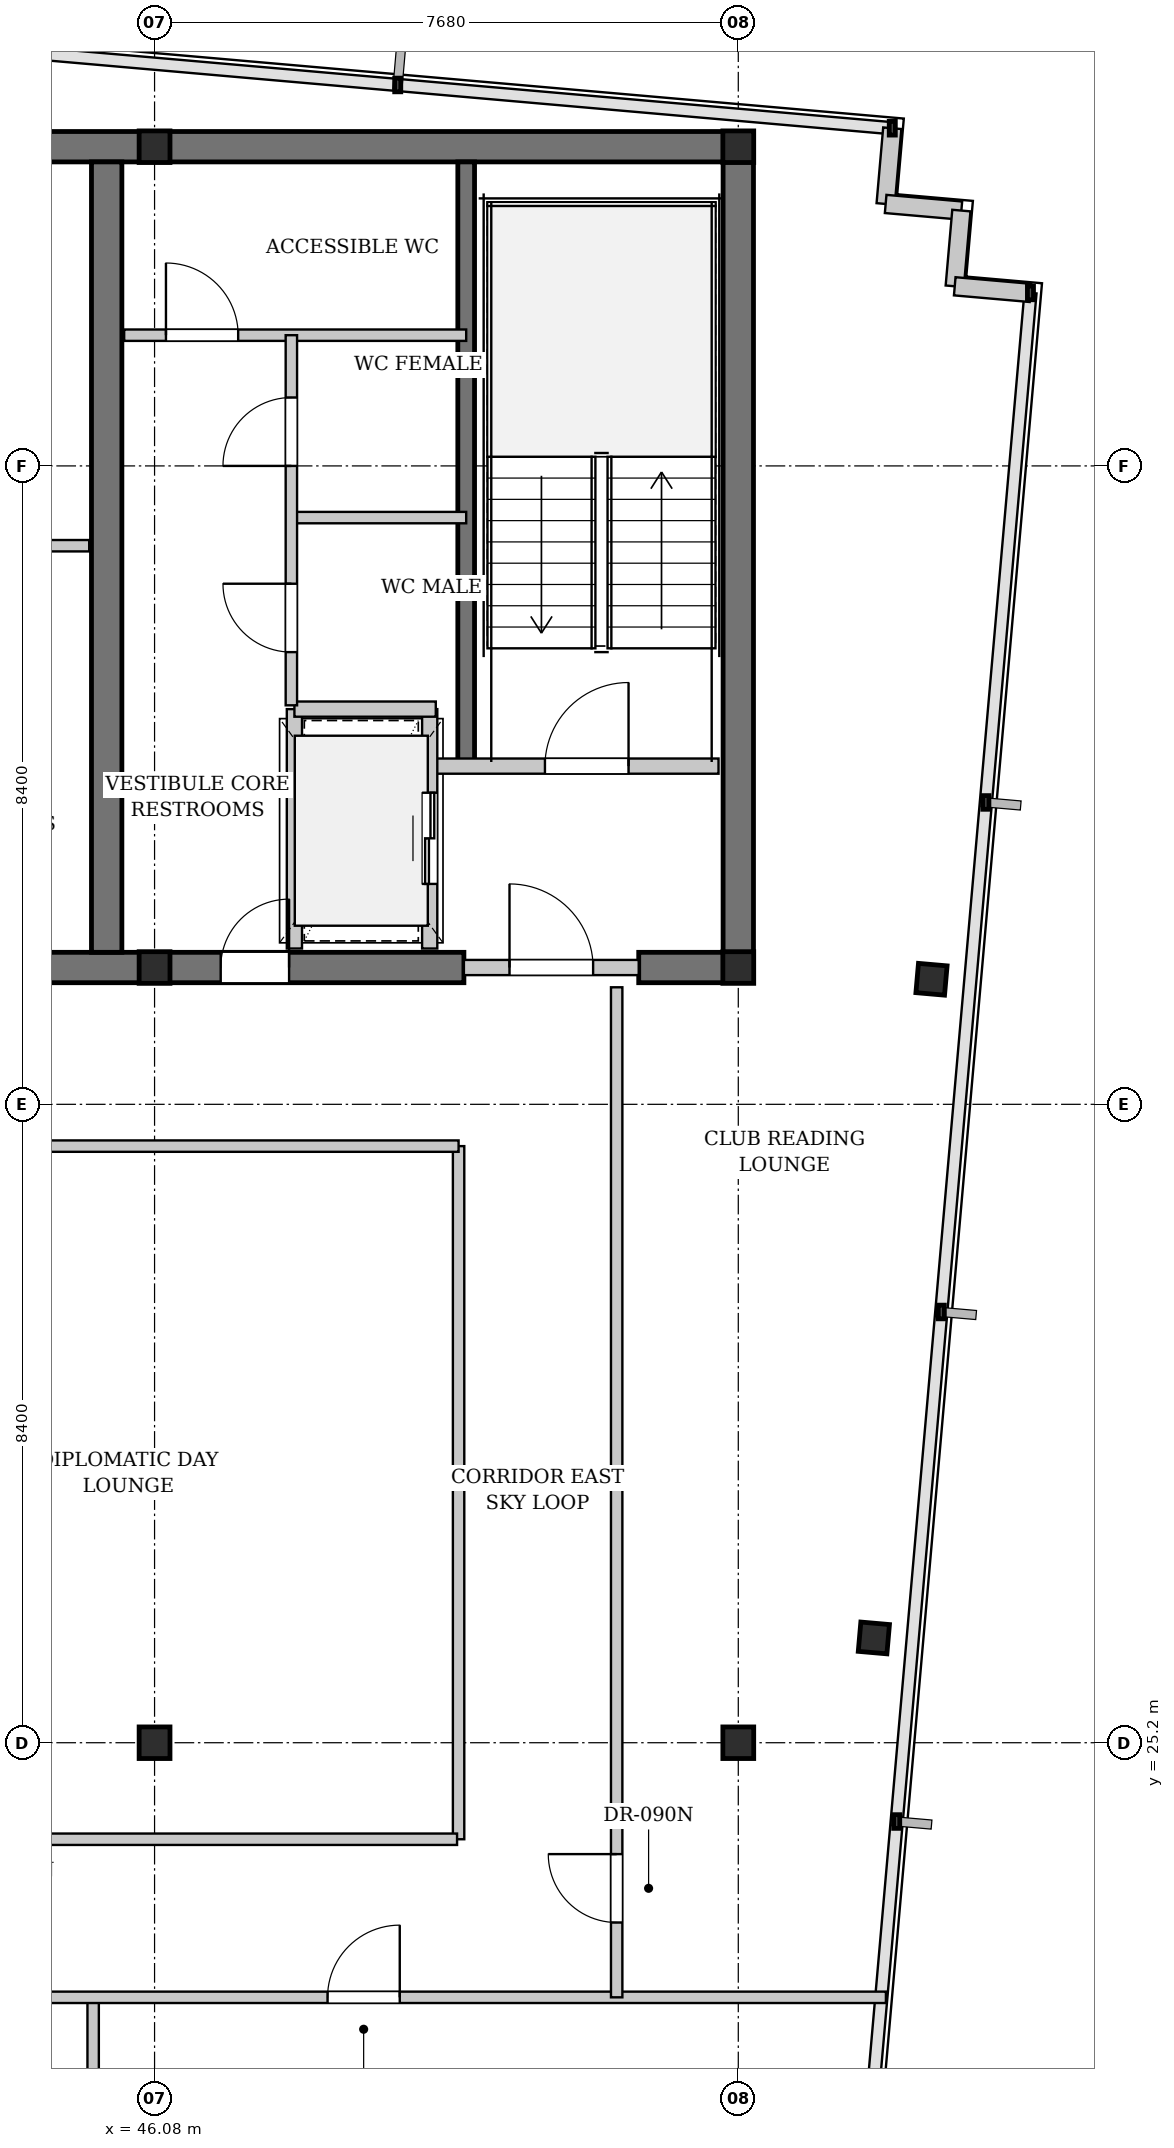
"""IFC4 building model, lengths in metres.
Left out: names, types, materials, properties, quantities, classifications, styles, units other than length and angle.
Written with IfcOpenShell. Run it as: python <this file> out.ifc"""

import sys

from ifc_helpers import new_model, si_unit, direction, frame, frame_2d, origin, origin_2d, place, context, subcontext, project, spatial, rectangle, i_section, extrude, element, fill, save


model = new_model("IFC4")
c1 = context("Model", 3, precision=1e-05, world=origin(), true_north=direction((0.0, 1.0)))
c2 = subcontext(c1, "Body", "Model", "MODEL_VIEW")
j1 = project(units=[si_unit("LENGTHUNIT", "METRE"), si_unit("PLANEANGLEUNIT", "RADIAN")], contexts=[c1])
p1 = place(None, origin())
s1 = spatial("IfcSite", under=j1, at=p1, CompositionType="ELEMENT")
p2 = place(p1, origin())
s2 = spatial("IfcBuilding", under=s1, at=p2, CompositionType="ELEMENT")
p3 = place(p2, frame((0.0, 0.0, 276.1)))
s3 = spatial("IfcBuildingStorey", under=s2, at=p3, CompositionType="ELEMENT", Elevation=276.1)
p4 = place(p3, frame((22.84, 46.2, 0.0), z_axis=(0.0, 0.0, 1.0), x_axis=(1.0, 0.0, 0.0)))
e1 = element("IfcWall", 1, at=p4, inside=s3, PredefinedType="SHEAR", context=c2, shape_type="SweptSolid", body=[
    extrude(rectangle(XDim=31.12, YDim=0.4, at=frame_2d((15.56, 0.0))), origin(), (0.0, 0.0, 1.0), 3.18),
])
p5 = place(p3, frame((42.1, 35.4, 0.0), z_axis=(0.0, 0.0, 1.0), x_axis=(1.0, 0.0, 0.0)))
e2 = element("IfcWall", 2, at=p5, inside=s3, PredefinedType="SHEAR", context=c2, shape_type="SweptSolid", body=[
    extrude(rectangle(XDim=8.05, YDim=0.4, at=frame_2d((4.025, 0.0))), origin(), (0.0, 0.0, 1.0), 3.18),
])
p6 = place(p5, frame((4.85, 0.0, 0.0)))
e3 = element("IfcOpeningElement", 3, at=p6, cuts=e2, PredefinedType="OPENING", context=c2, shape_type="SweptSolid", body=[
    extrude(rectangle(XDim=0.9, YDim=2.15, at=frame_2d((0.45, 1.075))), frame((0.0, 0.21, 0.0), z_axis=(0.0, -1.0, 0.0), x_axis=(1.0, 0.0, 0.0)), (0.0, 0.0, 1.0), 0.42),
])
p7 = place(p3, frame((52.45, 35.4, 0.0), z_axis=(0.0, 0.0, 1.0), x_axis=(1.0, 0.0, 0.0)))
e4 = element("IfcWall", 4, at=p7, inside=s3, PredefinedType="SHEAR", context=c2, shape_type="SweptSolid", body=[
    extrude(rectangle(XDim=1.51, YDim=0.4, at=frame_2d((0.755, 0.0))), origin(), (0.0, 0.0, 1.0), 3.18),
])
for number, where, z_axis, x_axis in (
    (5, (45.45, 35.6, 0.0), (0.0, 0.0, 1.0), (0.0, 1.0, 0.0)),
    (6, (53.76, 35.6, 0.0), (0.0, 0.0, 1.0), (0.0, 1.0, 0.0)),
):
    element("IfcWall", number, at=place(p3, frame(where, z_axis=z_axis, x_axis=x_axis)), inside=s3, PredefinedType="SHEAR", context=c2, shape_type="SweptSolid", body=[
        extrude(rectangle(XDim=10.4, YDim=0.4, at=frame_2d((5.2, 0.0))), origin(), (0.0, 0.0, 1.0), 3.18),
    ])
p8 = place(p3, frame((50.18, 38.05, 0.0), z_axis=(0.0, 0.0, 1.0), x_axis=(0.0, 1.0, 0.0)))
e7 = element("IfcWall", 7, at=p8, inside=s3, PredefinedType="SHEAR", context=c2, shape_type="SweptSolid", body=[
    extrude(rectangle(XDim=7.95, YDim=0.22, at=frame_2d((3.975, 0.0))), origin(), (0.0, 0.0, 1.0), 3.18),
])
for number, where, z_axis, x_axis in (
    (8, (46.08, 35.4, 0.0), (0.0, 0.0, 1.0), (1.0, 0.0, 0.0)),
    (9, (46.08, 46.2, 0.0), (0.0, 0.0, 1.0), (1.0, 0.0, 0.0)),
    (10, (46.08, 25.2, 0.0), (0.0, 0.0, 1.0), (1.0, 0.0, 0.0)),
    (11, (53.76, 35.4, 0.0), (0.0, 0.0, 1.0), (1.0, 0.0, 0.0)),
    (12, (53.76, 46.2, 0.0), (0.0, 0.0, 1.0), (1.0, 0.0, 0.0)),
    (13, (53.76, 25.2, 0.0), (0.0, 0.0, 1.0), (1.0, 0.0, 0.0)),
):
    element("IfcColumn", number, at=place(p3, frame(where, z_axis=z_axis, x_axis=x_axis)), inside=s3, PredefinedType="COLUMN", context=c2, shape_type="SweptSolid", body=[
        extrude(i_section(OverallWidth=0.406, OverallDepth=0.416, WebThickness=0.03, FlangeThickness=0.048, FilletRadius=0.015, at=origin_2d()), origin(), (0.0, 0.0, 1.0), 3.4),
    ])
for number, where, z_axis, x_axis in (
    (14, (55.544, 26.579, 0.0), (0.0, 0.0, 1.0), (0.996, -0.087, 0.0)),
    (15, (56.302, 35.246, 0.0), (0.0, 0.0, 1.0), (0.996, -0.087, 0.0)),
):
    element("IfcColumn", number, at=place(p3, frame(where, z_axis=z_axis, x_axis=x_axis)), inside=s3, PredefinedType="COLUMN", context=c2, shape_type="SweptSolid", body=[
        extrude(i_section(OverallWidth=0.378, OverallDepth=0.387, WebThickness=0.021, FlangeThickness=0.033, FilletRadius=0.015, at=origin_2d()), origin(), (0.0, 0.0, 1.0), 3.4),
    ])
for number, where, z_axis, x_axis in (
    (16, (55.786, 46.443, 0.0), (0.0, 0.0, 1.0), (-0.087, -0.996, 0.0)),
    (17, (55.699, 45.447, 0.0), (0.0, 0.0, 1.0), (0.996, -0.087, 0.0)),
    (18, (56.695, 45.36, 0.0), (0.0, 0.0, 1.0), (-0.087, -0.996, 0.0)),
    (19, (56.608, 44.364, 0.0), (0.0, 0.0, 1.0), (0.996, -0.087, 0.0)),
):
    element("IfcWall", number, at=place(p3, frame(where, z_axis=z_axis, x_axis=x_axis)), inside=s3, PredefinedType="SOLIDWALL", context=c2, shape_type="SweptSolid", body=[
        extrude(rectangle(XDim=1.0, YDim=0.24, at=frame_2d((0.5, 0.0))), origin(), (0.0, 0.0, 1.0), 3.18),
    ])
p9 = place(p3, frame((41.85, 40.95, 0.0), z_axis=(0.0, 0.0, 1.0), x_axis=(1.0, 0.0, 0.0)))
e20 = element("IfcWall", 20, at=p9, inside=s3, PredefinedType="PARTITIONING", context=c2, shape_type="SweptSolid", body=[
    extrude(rectangle(XDim=3.37, YDim=0.15, at=frame_2d((1.685, 0.0))), origin(), (0.0, 0.0, 1.0), 3.18),
])
p10 = place(p3, frame((49.78, 38.05, 0.0), z_axis=(0.0, 0.0, 1.0), x_axis=(1.0, 0.0, 0.0)))
e21 = element("IfcWall", 21, at=p10, inside=s3, PredefinedType="PARTITIONING", context=c2, shape_type="SweptSolid", body=[
    extrude(rectangle(XDim=3.72, YDim=0.2, at=frame_2d((1.86, 0.0))), origin(), (0.0, 0.0, 1.0), 3.18),
])
p11 = place(p10, frame((1.436, 0.0, 0.0)))
e22 = element("IfcOpeningElement", 22, at=p11, cuts=e21, PredefinedType="OPENING", context=c2, shape_type="SweptSolid", body=[
    extrude(rectangle(XDim=1.1, YDim=2.15, at=frame_2d((0.55, 1.075))), frame((0.0, 0.11, 0.0), z_axis=(0.0, -1.0, 0.0), x_axis=(1.0, 0.0, 0.0)), (0.0, 0.0, 1.0), 0.22),
])
p12 = place(p3, frame((50.15, 35.4, 0.0), z_axis=(0.0, 0.0, 1.0), x_axis=(1.0, 0.0, 0.0)))
e23 = element("IfcWall", 23, at=p12, inside=s3, PredefinedType="PARTITIONING", context=c2, shape_type="SweptSolid", body=[
    extrude(rectangle(XDim=2.3, YDim=0.2, at=frame_2d((1.15, 0.0))), origin(), (0.0, 0.0, 1.0), 2.575),
])
p13 = place(p12, frame((0.6, 0.0, 0.0)))
e24 = element("IfcOpeningElement", 24, at=p13, cuts=e23, PredefinedType="OPENING", context=c2, shape_type="SweptSolid", body=[
    extrude(rectangle(XDim=1.1, YDim=2.15, at=frame_2d((0.55, 1.075))), frame((0.0, 0.11, 0.0), z_axis=(0.0, -1.0, 0.0), x_axis=(1.0, 0.0, 0.0)), (0.0, 0.0, 1.0), 0.22),
])
p14 = place(p3, frame((49.7, 35.65, 0.0), z_axis=(0.0, 0.0, 1.0), x_axis=(0.0, 1.0, 0.0)))
e25 = element("IfcWall", 25, at=p14, inside=s3, PredefinedType="PARTITIONING", context=c2, shape_type="SweptSolid", body=[
    extrude(rectangle(XDim=3.15, YDim=0.2, at=frame_2d((1.575, 0.0))), origin(), (0.0, 0.0, 1.0), 3.18),
])
p15 = place(p14, frame((0.85, 0.0, 0.0)))
e26 = element("IfcOpeningElement", 26, at=p15, cuts=e25, PredefinedType="OPENING", context=c2, shape_type="SweptSolid", body=[
    extrude(rectangle(XDim=1.2, YDim=2.2, at=frame_2d((0.6, 1.1))), frame((0.0, 0.11, 0.0), z_axis=(0.0, -1.0, 0.0), x_axis=(1.0, 0.0, 0.0)), (0.0, 0.0, 1.0), 0.22),
])
p16 = place(p3, frame((47.92, 35.65, 0.0), z_axis=(0.0, 0.0, 1.0), x_axis=(0.0, 1.0, 0.0)))
e27 = element("IfcWall", 27, at=p16, inside=s3, PredefinedType="PARTITIONING", context=c2, shape_type="SweptSolid", body=[
    extrude(rectangle(XDim=3.15, YDim=0.2, at=frame_2d((1.575, 0.0))), origin(), (0.0, 0.0, 1.0), 3.18),
])
p17 = place(p3, frame((47.92, 38.8, 0.0), z_axis=(0.0, 0.0, 1.0), x_axis=(1.0, 0.0, 0.0)))
e28 = element("IfcWall", 28, at=p17, inside=s3, PredefinedType="PARTITIONING", context=c2, shape_type="SweptSolid", body=[
    extrude(rectangle(XDim=1.86, YDim=0.2, at=frame_2d((0.93, 0.0))), origin(), (0.0, 0.0, 1.0), 3.18),
])
p18 = place(p3, frame((45.68, 43.72, 0.0), z_axis=(0.0, 0.0, 1.0), x_axis=(1.0, 0.0, 0.0)))
e29 = element("IfcWall", 29, at=p18, inside=s3, PredefinedType="PARTITIONING", context=c2, shape_type="SweptSolid", body=[
    extrude(rectangle(XDim=4.5, YDim=0.15, at=frame_2d((2.25, 0.0))), origin(), (0.0, 0.0, 1.0), 3.18),
])
p19 = place(p18, frame((0.55, 0.0, 0.0)))
e30 = element("IfcOpeningElement", 30, at=p19, cuts=e29, PredefinedType="OPENING", context=c2, shape_type="SweptSolid", body=[
    extrude(rectangle(XDim=0.95, YDim=2.15, at=frame_2d((0.475, 1.075))), frame((0.0, 0.085, 0.0), z_axis=(0.0, -1.0, 0.0), x_axis=(1.0, 0.0, 0.0)), (0.0, 0.0, 1.0), 0.17),
])
p20 = place(p3, frame((47.88, 41.32, 0.0), z_axis=(0.0, 0.0, 1.0), x_axis=(1.0, 0.0, 0.0)))
e31 = element("IfcWall", 31, at=p20, inside=s3, PredefinedType="PARTITIONING", context=c2, shape_type="SweptSolid", body=[
    extrude(rectangle(XDim=2.3, YDim=0.15, at=frame_2d((1.15, 0.0))), origin(), (0.0, 0.0, 1.0), 3.18),
])
p21 = place(p3, frame((47.88, 38.85, 0.0), z_axis=(0.0, 0.0, 1.0), x_axis=(0.0, 1.0, 0.0)))
e32 = element("IfcWall", 32, at=p21, inside=s3, PredefinedType="PARTITIONING", context=c2, shape_type="SweptSolid", body=[
    extrude(rectangle(XDim=4.87, YDim=0.15, at=frame_2d((2.435, 0.0))), origin(), (0.0, 0.0, 1.0), 3.18),
])
p22 = place(p21, frame((0.7, 0.0, 0.0)))
e33 = element("IfcOpeningElement", 33, at=p22, cuts=e32, PredefinedType="OPENING", context=c2, shape_type="SweptSolid", body=[
    extrude(rectangle(XDim=0.9, YDim=2.15, at=frame_2d((0.45, 1.075))), frame((0.0, 0.085, 0.0), z_axis=(0.0, -1.0, 0.0), x_axis=(1.0, 0.0, 0.0)), (0.0, 0.0, 1.0), 0.17),
])
p23 = place(p21, frame((3.15, 0.0, 0.0)))
e34 = element("IfcOpeningElement", 34, at=p23, cuts=e32, PredefinedType="OPENING", context=c2, shape_type="SweptSolid", body=[
    extrude(rectangle(XDim=0.9, YDim=2.15, at=frame_2d((0.45, 1.075))), frame((0.0, 0.085, 0.0), z_axis=(0.0, -1.0, 0.0), x_axis=(1.0, 0.0, 0.0)), (0.0, 0.0, 1.0), 0.17),
])
p24 = place(p3, frame((45.272, 16.264, 0.0), z_axis=(0.0, 0.0, 1.0), x_axis=(0.0, 1.0, 0.0)))
e35 = element("IfcWall", 35, at=p24, inside=s3, PredefinedType="PARTITIONING", context=c2, shape_type="SweptSolid", body=[
    extrude(rectangle(XDim=5.606, YDim=0.15, at=frame_2d((2.803, 0.0))), origin(), (0.0, 0.0, 1.0), 2.575),
])
p25 = place(p3, frame((35.62, 21.85, 0.0), z_axis=(0.0, 0.0, 1.0), x_axis=(1.0, 0.0, 0.0)))
e36 = element("IfcWall", 36, at=p25, inside=s3, PredefinedType="PARTITIONING", context=c2, shape_type="SweptSolid", body=[
    extrude(rectangle(XDim=20.082, YDim=0.15, at=frame_2d((10.041, 0.0))), origin(), (0.0, 0.0, 1.0), 3.18),
])
p26 = place(p25, frame((2.216, 0.0, 0.0)))
e37 = element("IfcOpeningElement", 37, at=p26, cuts=e36, PredefinedType="OPENING", context=c2, shape_type="SweptSolid", body=[
    extrude(rectangle(XDim=0.95, YDim=2.15, at=frame_2d((0.475, 1.075))), frame((0.0, 0.085, 0.0), z_axis=(0.0, -1.0, 0.0), x_axis=(1.0, 0.0, 0.0)), (0.0, 0.0, 1.0), 0.17),
])
p27 = place(p25, frame((7.037, 0.0, 0.0)))
e38 = element("IfcOpeningElement", 38, at=p27, cuts=e36, PredefinedType="OPENING", context=c2, shape_type="SweptSolid", body=[
    extrude(rectangle(XDim=0.95, YDim=2.15, at=frame_2d((0.475, 1.075))), frame((0.0, 0.085, 0.0), z_axis=(0.0, -1.0, 0.0), x_axis=(1.0, 0.0, 0.0)), (0.0, 0.0, 1.0), 0.17),
])
p28 = place(p25, frame((12.736, 0.0, 0.0)))
e39 = element("IfcOpeningElement", 39, at=p28, cuts=e36, PredefinedType="OPENING", context=c2, shape_type="SweptSolid", body=[
    extrude(rectangle(XDim=0.95, YDim=2.15, at=frame_2d((0.475, 1.075))), frame((0.0, 0.085, 0.0), z_axis=(0.0, -1.0, 0.0), x_axis=(1.0, 0.0, 0.0)), (0.0, 0.0, 1.0), 0.17),
])
p29 = place(p3, frame((52.16, 21.85, 0.0), z_axis=(0.0, 0.0, 1.0), x_axis=(0.0, 1.0, 0.0)))
e40 = element("IfcWall", 40, at=p29, inside=s3, PredefinedType="PARTITIONING", context=c2, shape_type="SweptSolid", body=[
    extrude(rectangle(XDim=13.29, YDim=0.15, at=frame_2d((6.645, 0.0))), origin(), (0.0, 0.0, 1.0), 3.18),
])
p30 = place(p29, frame((0.984, 0.0, 0.0)))
e41 = element("IfcOpeningElement", 41, at=p30, cuts=e40, PredefinedType="OPENING", context=c2, shape_type="SweptSolid", body=[
    extrude(rectangle(XDim=0.9, YDim=2.15, at=frame_2d((0.45, 1.075))), frame((0.0, 0.085, 0.0), z_axis=(0.0, -1.0, 0.0), x_axis=(1.0, 0.0, 0.0)), (0.0, 0.0, 1.0), 0.17),
])
p31 = place(p3, frame((50.08, 23.93, 0.0), z_axis=(0.0, 0.0, 1.0), x_axis=(0.0, 1.0, 0.0)))
e42 = element("IfcWall", 42, at=p31, inside=s3, PredefinedType="PARTITIONING", context=c2, shape_type="SweptSolid", body=[
    extrude(rectangle(XDim=9.12, YDim=0.15, at=frame_2d((4.56, 0.0))), origin(), (0.0, 0.0, 1.0), 3.18),
])
p32 = place(p3, frame((35.62, 33.05, 0.0), z_axis=(0.0, 0.0, 1.0), x_axis=(1.0, 0.0, 0.0)))
e43 = element("IfcWall", 43, at=p32, inside=s3, PredefinedType="PARTITIONING", context=c2, shape_type="SweptSolid", body=[
    extrude(rectangle(XDim=14.46, YDim=0.15, at=frame_2d((7.23, 0.0))), origin(), (0.0, 0.0, 1.0), 3.18),
])
p33 = place(p3, frame((35.63, 23.93, 0.0), z_axis=(0.0, 0.0, 1.0), x_axis=(1.0, 0.0, 0.0)))
e44 = element("IfcWall", 44, at=p33, inside=s3, PredefinedType="PARTITIONING", context=c2, shape_type="SweptSolid", body=[
    extrude(rectangle(XDim=14.43, YDim=0.15, at=frame_2d((7.215, 0.0))), origin(), (0.0, 0.0, 1.0), 3.18),
])
p34 = place(p33, frame((6.765, 0.0, 0.0)))
e45 = element("IfcOpeningElement", 45, at=p34, cuts=e44, PredefinedType="OPENING", context=c2, shape_type="SweptSolid", body=[
    extrude(rectangle(XDim=0.9, YDim=2.15, at=frame_2d((0.45, 1.075))), frame((0.0, 0.085, 0.0), z_axis=(0.0, -1.0, 0.0), x_axis=(1.0, 0.0, 0.0)), (0.0, 0.0, 1.0), 0.17),
])
p35 = place(p11, origin())
e46 = element("IfcDoor", 46, at=p35, inside=s3, OperationType="SINGLE_SWING_RIGHT", PredefinedType="DOOR", context=c2, shape_type="SweptSolid", body=[
    extrude(rectangle(XDim=1.1, YDim=2.15, at=frame_2d((0.55, 1.075))), frame((0.0, 0.025, 0.0), z_axis=(0.0, -1.0, 0.0), x_axis=(1.0, 0.0, 0.0)), (0.0, 0.0, 1.0), 0.05),
])
fill(e22, e46)
p36 = place(p13, origin())
e47 = element("IfcDoor", 47, at=p36, inside=s3, OperationType="SINGLE_SWING_LEFT", PredefinedType="DOOR", context=c2, shape_type="SweptSolid", body=[
    extrude(rectangle(XDim=1.1, YDim=2.15, at=frame_2d((0.55, 1.075))), frame((0.0, 0.025, 0.0), z_axis=(0.0, -1.0, 0.0), x_axis=(1.0, 0.0, 0.0)), (0.0, 0.0, 1.0), 0.05),
])
fill(e24, e47)
p37 = place(p15, origin())
e48 = element("IfcDoor", 48, at=p37, inside=s3, OperationType="DOUBLE_DOOR_SLIDING", PredefinedType="DOOR", context=c2, shape_type="SweptSolid", body=[
    extrude(rectangle(XDim=1.2, YDim=2.2, at=frame_2d((0.6, 1.1))), frame((0.0, 0.025, 0.0), z_axis=(0.0, -1.0, 0.0), x_axis=(1.0, 0.0, 0.0)), (0.0, 0.0, 1.0), 0.05),
])
fill(e26, e48)
p38 = place(p19, origin())
e49 = element("IfcDoor", 49, at=p38, inside=s3, OperationType="SINGLE_SWING_LEFT", PredefinedType="DOOR", context=c2, shape_type="SweptSolid", body=[
    extrude(rectangle(XDim=0.95, YDim=2.15, at=frame_2d((0.475, 1.075))), frame((0.0, 0.025, 0.0), z_axis=(0.0, -1.0, 0.0), x_axis=(1.0, 0.0, 0.0)), (0.0, 0.0, 1.0), 0.05),
])
fill(e30, e49)
p39 = place(p22, origin())
e50 = element("IfcDoor", 50, at=p39, inside=s3, OperationType="SINGLE_SWING_RIGHT", PredefinedType="DOOR", context=c2, shape_type="SweptSolid", body=[
    extrude(rectangle(XDim=0.9, YDim=2.15, at=frame_2d((0.45, 1.075))), frame((0.0, 0.025, 0.0), z_axis=(0.0, -1.0, 0.0), x_axis=(1.0, 0.0, 0.0)), (0.0, 0.0, 1.0), 0.05),
])
fill(e33, e50)
p40 = place(p23, origin())
e51 = element("IfcDoor", 51, at=p40, inside=s3, OperationType="SINGLE_SWING_LEFT", PredefinedType="DOOR", context=c2, shape_type="SweptSolid", body=[
    extrude(rectangle(XDim=0.9, YDim=2.15, at=frame_2d((0.45, 1.075))), frame((0.0, 0.025, 0.0), z_axis=(0.0, -1.0, 0.0), x_axis=(1.0, 0.0, 0.0)), (0.0, 0.0, 1.0), 0.05),
])
fill(e34, e51)
p41 = place(p28, origin())
e52 = element("IfcDoor", 52, at=p41, inside=s3, OperationType="SINGLE_SWING_RIGHT", PredefinedType="DOOR", context=c2, shape_type="SweptSolid", body=[
    extrude(rectangle(XDim=0.95, YDim=2.15, at=frame_2d((0.475, 1.075))), frame((0.0, 0.025, 0.0), z_axis=(0.0, -1.0, 0.0), x_axis=(1.0, 0.0, 0.0)), (0.0, 0.0, 1.0), 0.05),
])
fill(e39, e52)
p42 = place(p30, origin())
e53 = element("IfcDoor", 53, at=p42, inside=s3, OperationType="SINGLE_SWING_RIGHT", PredefinedType="DOOR", context=c2, shape_type="SweptSolid", body=[
    extrude(rectangle(XDim=0.9, YDim=2.15, at=frame_2d((0.45, 1.075))), frame((0.0, 0.025, 0.0), z_axis=(0.0, -1.0, 0.0), x_axis=(1.0, 0.0, 0.0)), (0.0, 0.0, 1.0), 0.05),
])
fill(e41, e53)
p43 = place(p6, origin())
e54 = element("IfcDoor", 54, at=p43, inside=s3, OperationType="SINGLE_SWING_RIGHT", PredefinedType="DOOR", context=c2, shape_type="SweptSolid", body=[
    extrude(rectangle(XDim=0.9, YDim=2.15, at=frame_2d((0.45, 1.075))), frame((0.0, 0.025, 0.0), z_axis=(0.0, -1.0, 0.0), x_axis=(1.0, 0.0, 0.0)), (0.0, 0.0, 1.0), 0.05),
])
fill(e3, e54)
save(model, sys.argv[1])
